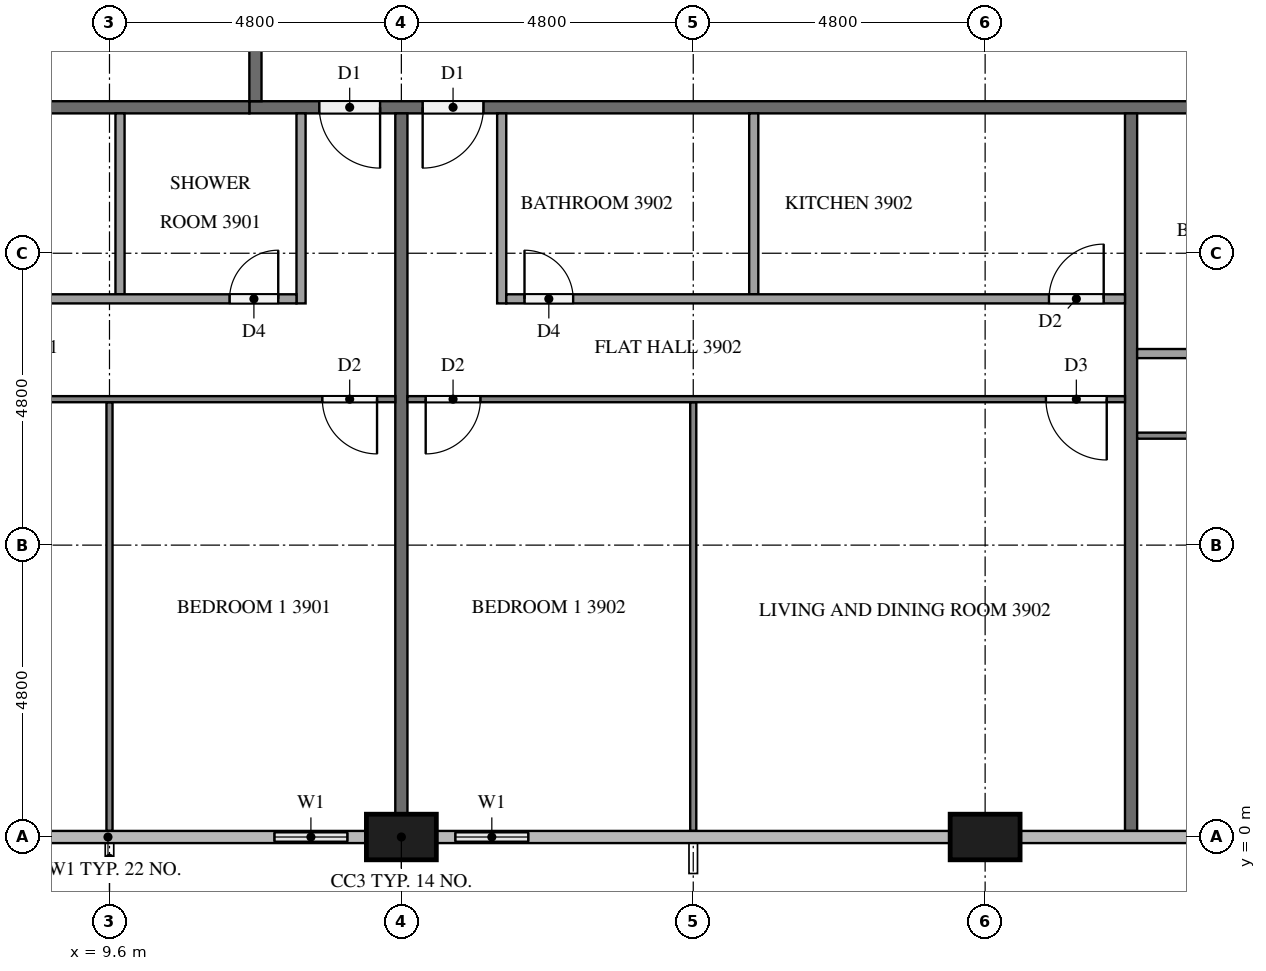
"""IFC4 building model, lengths in metres.
Left out: names, types, materials, properties, quantities, classifications, styles, units other than length and angle.
Written with IfcOpenShell. Run it as: python <this file> out.ifc"""

import sys

from ifc_helpers import new_model, si_unit, direction, frame, frame_2d, origin, origin_2d, place, context, subcontext, project, spatial, rectangle, extrude, element, fill, save


model = new_model("IFC4")
c1 = context("Model", 3, precision=1e-05, world=origin(), true_north=direction((0.0, 1.0)))
c2 = subcontext(c1, "Body", "Model", "MODEL_VIEW")
j1 = project(units=[si_unit("LENGTHUNIT", "METRE"), si_unit("PLANEANGLEUNIT", "RADIAN")], contexts=[c1])
p1 = place(None, origin())
s1 = spatial("IfcSite", under=j1, at=p1, CompositionType="ELEMENT")
p2 = place(p1, origin())
s2 = spatial("IfcBuilding", under=s1, at=p2, CompositionType="ELEMENT")
p3 = place(p2, frame((0.0, 0.0, 152.5)))
s3 = spatial("IfcBuildingStorey", under=s2, at=p3, CompositionType="ELEMENT", Elevation=152.5)
for number, where, z_axis, x_axis in (
    (1, (14.4, 0.0, 0.0), (0.0, 0.0, 1.0), (1.0, 0.0, 0.0)),
    (2, (24.0, 0.0, 0.0), (0.0, 0.0, 1.0), (1.0, 0.0, 0.0)),
):
    element("IfcColumn", number, at=place(p3, frame(where, z_axis=z_axis, x_axis=x_axis)), inside=s3, PredefinedType="COLUMN", context=c2, shape_type="SweptSolid", body=[
        extrude(rectangle(XDim=1.15, YDim=0.75, at=origin_2d()), origin(), (0.0, 0.0, 1.0), 3.2),
    ])
p4 = place(p3, frame((12.0, 0.0, 0.0), z_axis=(0.0, 0.0, 1.0), x_axis=(1.0, 0.0, 0.0)))
e3 = element("IfcWall", 3, at=p4, inside=s3, PredefinedType="SOLIDWALL", context=c2, shape_type="SweptSolid", body=[
    extrude(rectangle(XDim=1.825, YDim=0.15, at=frame_2d((0.913, 0.0))), origin(), (0.0, 0.0, 1.0), 3.2),
])
p5 = place(p4, frame((0.312, 0.0, 0.9)))
e4 = element("IfcOpeningElement", 4, at=p5, cuts=e3, PredefinedType="OPENING", context=c2, shape_type="SweptSolid", body=[
    extrude(rectangle(XDim=1.2, YDim=1.4, at=frame_2d((0.6, 0.7))), frame((0.0, 0.085, 0.0), z_axis=(0.0, -1.0, 0.0), x_axis=(1.0, 0.0, 0.0)), (0.0, 0.0, 1.0), 0.17),
])
p6 = place(p3, frame((14.975, 0.0, 0.0), z_axis=(0.0, 0.0, 1.0), x_axis=(1.0, 0.0, 0.0)))
e5 = element("IfcWall", 5, at=p6, inside=s3, PredefinedType="SOLIDWALL", context=c2, shape_type="SweptSolid", body=[
    extrude(rectangle(XDim=1.825, YDim=0.15, at=frame_2d((0.913, 0.0))), origin(), (0.0, 0.0, 1.0), 3.2),
])
p7 = place(p6, frame((0.312, 0.0, 0.9)))
e6 = element("IfcOpeningElement", 6, at=p7, cuts=e5, PredefinedType="OPENING", context=c2, shape_type="SweptSolid", body=[
    extrude(rectangle(XDim=1.2, YDim=1.4, at=frame_2d((0.6, 0.7))), frame((0.0, 0.085, 0.0), z_axis=(0.0, -1.0, 0.0), x_axis=(1.0, 0.0, 0.0)), (0.0, 0.0, 1.0), 0.17),
])
p8 = place(p3, frame((50.5, 12.0, 0.0), z_axis=(0.0, 0.0, 1.0), x_axis=(-1.0, 0.0, 0.0)))
e7 = element("IfcWall", 7, at=p8, inside=s3, PredefinedType="PARTITIONING", context=c2, shape_type="SweptSolid", body=[
    extrude(rectangle(XDim=38.6, YDim=0.2, at=frame_2d((19.3, 0.0))), origin(), (0.0, 0.0, 1.0), 3.2),
])
p9 = place(p8, frame((36.45, 0.0, 0.0)))
e8 = element("IfcOpeningElement", 8, at=p9, cuts=e7, PredefinedType="OPENING", context=c2, shape_type="SweptSolid", body=[
    extrude(rectangle(XDim=1.0, YDim=2.1, at=frame_2d((0.5, 1.05))), frame((0.0, 0.11, 0.0), z_axis=(0.0, -1.0, 0.0), x_axis=(1.0, 0.0, 0.0)), (0.0, 0.0, 1.0), 0.22),
])
p10 = place(p8, frame((34.75, 0.0, 0.0)))
e9 = element("IfcOpeningElement", 9, at=p10, cuts=e7, PredefinedType="OPENING", context=c2, shape_type="SweptSolid", body=[
    extrude(rectangle(XDim=1.0, YDim=2.1, at=frame_2d((0.5, 1.05))), frame((0.0, 0.11, 0.0), z_axis=(0.0, -1.0, 0.0), x_axis=(1.0, 0.0, 0.0)), (0.0, 0.0, 1.0), 0.22),
])
p11 = place(p8, frame((10.05, 0.0, 0.0)))
e10 = element("IfcOpeningElement", 10, at=p11, cuts=e7, PredefinedType="OPENING", context=c2, shape_type="SweptSolid", body=[
    extrude(rectangle(XDim=1.0, YDim=2.1, at=frame_2d((0.5, 1.05))), frame((0.0, 0.11, 0.0), z_axis=(0.0, -1.0, 0.0), x_axis=(1.0, 0.0, 0.0)), (0.0, 0.0, 1.0), 0.22),
])
p12 = place(p8, frame((8.35, 0.0, 0.0)))
e11 = element("IfcOpeningElement", 11, at=p12, cuts=e7, PredefinedType="OPENING", context=c2, shape_type="SweptSolid", body=[
    extrude(rectangle(XDim=1.0, YDim=2.1, at=frame_2d((0.5, 1.05))), frame((0.0, 0.11, 0.0), z_axis=(0.0, -1.0, 0.0), x_axis=(1.0, 0.0, 0.0)), (0.0, 0.0, 1.0), 0.22),
])
p13 = place(p3, frame((12.0, 12.1, 0.0), z_axis=(0.0, 0.0, 1.0), x_axis=(0.0, 1.0, 0.0)))
e12 = element("IfcWall", 12, at=p13, inside=s3, PredefinedType="PARTITIONING", context=c2, shape_type="SweptSolid", body=[
    extrude(rectangle(XDim=28.6, YDim=0.2, at=frame_2d((14.3, 0.0))), origin(), (0.0, 0.0, 1.0), 3.2),
])
p14 = place(p13, frame((27.35, 0.0, 0.0)))
e13 = element("IfcOpeningElement", 13, at=p14, cuts=e12, PredefinedType="OPENING", context=c2, shape_type="SweptSolid", body=[
    extrude(rectangle(XDim=1.0, YDim=2.1, at=frame_2d((0.5, 1.05))), frame((0.0, 0.11, 0.0), z_axis=(0.0, -1.0, 0.0), x_axis=(1.0, 0.0, 0.0)), (0.0, 0.0, 1.0), 0.22),
])
p15 = place(p13, frame((20.15, 0.0, 0.0)))
e14 = element("IfcOpeningElement", 14, at=p15, cuts=e12, PredefinedType="OPENING", context=c2, shape_type="SweptSolid", body=[
    extrude(rectangle(XDim=1.0, YDim=2.1, at=frame_2d((0.5, 1.05))), frame((0.0, 0.11, 0.0), z_axis=(0.0, -1.0, 0.0), x_axis=(1.0, 0.0, 0.0)), (0.0, 0.0, 1.0), 0.22),
])
p16 = place(p13, frame((10.55, 0.0, 0.0)))
e15 = element("IfcOpeningElement", 15, at=p16, cuts=e12, PredefinedType="OPENING", context=c2, shape_type="SweptSolid", body=[
    extrude(rectangle(XDim=1.0, YDim=2.1, at=frame_2d((0.5, 1.05))), frame((0.0, 0.11, 0.0), z_axis=(0.0, -1.0, 0.0), x_axis=(1.0, 0.0, 0.0)), (0.0, 0.0, 1.0), 0.22),
])
p17 = place(p3, frame((14.4, 11.9, 0.0), z_axis=(0.0, 0.0, 1.0), x_axis=(0.0, -1.0, 0.0)))
e16 = element("IfcWall", 16, at=p17, inside=s3, PredefinedType="PARTITIONING", context=c2, shape_type="SweptSolid", body=[
    extrude(rectangle(XDim=11.525, YDim=0.2, at=frame_2d((5.762, 0.0))), origin(), (0.0, 0.0, 1.0), 3.2),
])
for number, where, z_axis, x_axis in (
    (17, (0.1, 12.0, 0.0), (0.0, 0.0, 1.0), (1.0, 0.0, 0.0)),
    (18, (26.4, 11.9, 0.0), (0.0, 0.0, 1.0), (0.0, -1.0, 0.0)),
):
    element("IfcWall", number, at=place(p3, frame(where, z_axis=z_axis, x_axis=x_axis)), inside=s3, PredefinedType="PARTITIONING", context=c2, shape_type="SweptSolid", body=[
        extrude(rectangle(XDim=11.8, YDim=0.2, at=frame_2d((5.9, 0.0))), origin(), (0.0, 0.0, 1.0), 3.2),
    ])
p18 = place(p3, frame((9.6, 7.15, 0.0), z_axis=(0.0, 0.0, 1.0), x_axis=(0.0, -1.0, 0.0)))
e19 = element("IfcWall", 19, at=p18, inside=s3, PredefinedType="PARTITIONING", context=c2, shape_type="SweptSolid", body=[
    extrude(rectangle(XDim=7.05, YDim=0.1, at=frame_2d((3.525, 0.0))), origin(), (0.0, 0.0, 1.0), 3.2),
])
p19 = place(p3, frame((14.3, 7.2, 0.0), z_axis=(0.0, 0.0, 1.0), x_axis=(-1.0, 0.0, 0.0)))
e20 = element("IfcWall", 20, at=p19, inside=s3, PredefinedType="PARTITIONING", context=c2, shape_type="SweptSolid", body=[
    extrude(rectangle(XDim=14.2, YDim=0.1, at=frame_2d((7.1, 0.0))), origin(), (0.0, 0.0, 1.0), 3.2),
])
p20 = place(p19, frame((0.3, 0.0, 0.0)))
e21 = element("IfcOpeningElement", 21, at=p20, cuts=e20, PredefinedType="OPENING", context=c2, shape_type="SweptSolid", body=[
    extrude(rectangle(XDim=0.9, YDim=2.1, at=frame_2d((0.45, 1.05))), frame((0.0, 0.06, 0.0), z_axis=(0.0, -1.0, 0.0), x_axis=(1.0, 0.0, 0.0)), (0.0, 0.0, 1.0), 0.12),
])
p21 = place(p19, frame((8.25, 0.0, 0.0)))
e22 = element("IfcOpeningElement", 22, at=p21, cuts=e20, PredefinedType="OPENING", context=c2, shape_type="SweptSolid", body=[
    extrude(rectangle(XDim=0.9, YDim=2.1, at=frame_2d((0.45, 1.05))), frame((0.0, 0.06, 0.0), z_axis=(0.0, -1.0, 0.0), x_axis=(1.0, 0.0, 0.0)), (0.0, 0.0, 1.0), 0.12),
])
p22 = place(p19, frame((9.85, 0.0, 0.0)))
e23 = element("IfcOpeningElement", 23, at=p22, cuts=e20, PredefinedType="OPENING", context=c2, shape_type="SweptSolid", body=[
    extrude(rectangle(XDim=1.0, YDim=2.1, at=frame_2d((0.5, 1.05))), frame((0.0, 0.06, 0.0), z_axis=(0.0, -1.0, 0.0), x_axis=(1.0, 0.0, 0.0)), (0.0, 0.0, 1.0), 0.12),
])
p23 = place(p3, frame((9.773, 11.9, 0.0), z_axis=(0.0, 0.0, 1.0), x_axis=(0.0, -1.0, 0.0)))
e24 = element("IfcWall", 24, at=p23, inside=s3, PredefinedType="PARTITIONING", context=c2, shape_type="SweptSolid", body=[
    extrude(rectangle(XDim=2.975, YDim=0.15, at=frame_2d((1.487, 0.0))), origin(), (0.0, 0.0, 1.0), 3.2),
])
p24 = place(p3, frame((12.75, 11.9, 0.0), z_axis=(0.0, 0.0, 1.0), x_axis=(0.0, -1.0, 0.0)))
e25 = element("IfcWall", 25, at=p24, inside=s3, PredefinedType="PARTITIONING", context=c2, shape_type="SweptSolid", body=[
    extrude(rectangle(XDim=3.125, YDim=0.15, at=frame_2d((1.562, 0.0))), origin(), (0.0, 0.0, 1.0), 3.2),
])
p25 = place(p3, frame((0.1, 8.85, 0.0), z_axis=(0.0, 0.0, 1.0), x_axis=(1.0, 0.0, 0.0)))
e26 = element("IfcWall", 26, at=p25, inside=s3, PredefinedType="PARTITIONING", context=c2, shape_type="SweptSolid", body=[
    extrude(rectangle(XDim=12.575, YDim=0.15, at=frame_2d((6.288, 0.0))), origin(), (0.0, 0.0, 1.0), 3.2),
])
p26 = place(p25, frame((11.475, 0.0, 0.0)))
e27 = element("IfcOpeningElement", 27, at=p26, cuts=e26, PredefinedType="OPENING", context=c2, shape_type="SweptSolid", body=[
    extrude(rectangle(XDim=0.8, YDim=2.1, at=frame_2d((0.4, 1.05))), frame((0.0, 0.085, 0.0), z_axis=(0.0, -1.0, 0.0), x_axis=(1.0, 0.0, 0.0)), (0.0, 0.0, 1.0), 0.17),
])
p27 = place(p25, frame((4.194, 0.0, 0.0)))
e28 = element("IfcOpeningElement", 28, at=p27, cuts=e26, PredefinedType="OPENING", context=c2, shape_type="SweptSolid", body=[
    extrude(rectangle(XDim=0.9, YDim=2.1, at=frame_2d((0.45, 1.05))), frame((0.0, 0.085, 0.0), z_axis=(0.0, -1.0, 0.0), x_axis=(1.0, 0.0, 0.0)), (0.0, 0.0, 1.0), 0.17),
])
p28 = place(p25, frame((2.644, 0.0, 0.0)))
e29 = element("IfcOpeningElement", 29, at=p28, cuts=e26, PredefinedType="OPENING", context=c2, shape_type="SweptSolid", body=[
    extrude(rectangle(XDim=0.9, YDim=2.1, at=frame_2d((0.45, 1.05))), frame((0.0, 0.085, 0.0), z_axis=(0.0, -1.0, 0.0), x_axis=(1.0, 0.0, 0.0)), (0.0, 0.0, 1.0), 0.17),
])
p29 = place(p3, frame((19.2, 7.15, 0.0), z_axis=(0.0, 0.0, 1.0), x_axis=(0.0, -1.0, 0.0)))
e30 = element("IfcWall", 30, at=p29, inside=s3, PredefinedType="PARTITIONING", context=c2, shape_type="SweptSolid", body=[
    extrude(rectangle(XDim=7.05, YDim=0.1, at=frame_2d((3.525, 0.0))), origin(), (0.0, 0.0, 1.0), 3.2),
])
p30 = place(p3, frame((26.3, 7.2, 0.0), z_axis=(0.0, 0.0, 1.0), x_axis=(-1.0, 0.0, 0.0)))
e31 = element("IfcWall", 31, at=p30, inside=s3, PredefinedType="PARTITIONING", context=c2, shape_type="SweptSolid", body=[
    extrude(rectangle(XDim=11.8, YDim=0.1, at=frame_2d((5.9, 0.0))), origin(), (0.0, 0.0, 1.0), 3.2),
])
p31 = place(p30, frame((10.6, 0.0, 0.0)))
e32 = element("IfcOpeningElement", 32, at=p31, cuts=e31, PredefinedType="OPENING", context=c2, shape_type="SweptSolid", body=[
    extrude(rectangle(XDim=0.9, YDim=2.1, at=frame_2d((0.45, 1.05))), frame((0.0, 0.06, 0.0), z_axis=(0.0, -1.0, 0.0), x_axis=(1.0, 0.0, 0.0)), (0.0, 0.0, 1.0), 0.12),
])
p32 = place(p30, frame((0.3, 0.0, 0.0)))
e33 = element("IfcOpeningElement", 33, at=p32, cuts=e31, PredefinedType="OPENING", context=c2, shape_type="SweptSolid", body=[
    extrude(rectangle(XDim=1.0, YDim=2.1, at=frame_2d((0.5, 1.05))), frame((0.0, 0.06, 0.0), z_axis=(0.0, -1.0, 0.0), x_axis=(1.0, 0.0, 0.0)), (0.0, 0.0, 1.0), 0.12),
])
p33 = place(p3, frame((20.195, 11.9, 0.0), z_axis=(0.0, 0.0, 1.0), x_axis=(0.0, -1.0, 0.0)))
e34 = element("IfcWall", 34, at=p33, inside=s3, PredefinedType="PARTITIONING", context=c2, shape_type="SweptSolid", body=[
    extrude(rectangle(XDim=2.975, YDim=0.15, at=frame_2d((1.487, 0.0))), origin(), (0.0, 0.0, 1.0), 3.2),
])
p34 = place(p3, frame((16.05, 11.9, 0.0), z_axis=(0.0, 0.0, 1.0), x_axis=(0.0, -1.0, 0.0)))
e35 = element("IfcWall", 35, at=p34, inside=s3, PredefinedType="PARTITIONING", context=c2, shape_type="SweptSolid", body=[
    extrude(rectangle(XDim=3.125, YDim=0.15, at=frame_2d((1.562, 0.0))), origin(), (0.0, 0.0, 1.0), 3.2),
])
p35 = place(p3, frame((16.125, 8.85, 0.0), z_axis=(0.0, 0.0, 1.0), x_axis=(1.0, 0.0, 0.0)))
e36 = element("IfcWall", 36, at=p35, inside=s3, PredefinedType="PARTITIONING", context=c2, shape_type="SweptSolid", body=[
    extrude(rectangle(XDim=10.175, YDim=0.15, at=frame_2d((5.087, 0.0))), origin(), (0.0, 0.0, 1.0), 3.2),
])
p36 = place(p35, frame((0.3, 0.0, 0.0)))
e37 = element("IfcOpeningElement", 37, at=p36, cuts=e36, PredefinedType="OPENING", context=c2, shape_type="SweptSolid", body=[
    extrude(rectangle(XDim=0.8, YDim=2.1, at=frame_2d((0.4, 1.05))), frame((0.0, 0.085, 0.0), z_axis=(0.0, -1.0, 0.0), x_axis=(1.0, 0.0, 0.0)), (0.0, 0.0, 1.0), 0.17),
])
p37 = place(p35, frame((8.925, 0.0, 0.0)))
e38 = element("IfcOpeningElement", 38, at=p37, cuts=e36, PredefinedType="OPENING", context=c2, shape_type="SweptSolid", body=[
    extrude(rectangle(XDim=0.9, YDim=2.1, at=frame_2d((0.45, 1.05))), frame((0.0, 0.085, 0.0), z_axis=(0.0, -1.0, 0.0), x_axis=(1.0, 0.0, 0.0)), (0.0, 0.0, 1.0), 0.17),
])
p38 = place(p3, frame((40.7, 6.6, 0.0), z_axis=(0.0, 0.0, 1.0), x_axis=(-1.0, 0.0, 0.0)))
e39 = element("IfcWall", 39, at=p38, inside=s3, PredefinedType="PARTITIONING", context=c2, shape_type="SweptSolid", body=[
    extrude(rectangle(XDim=14.2, YDim=0.1, at=frame_2d((7.1, 0.0))), origin(), (0.0, 0.0, 1.0), 3.2),
])
p39 = place(p38, frame((0.3, 0.0, 0.0)))
e40 = element("IfcOpeningElement", 40, at=p39, cuts=e39, PredefinedType="OPENING", context=c2, shape_type="SweptSolid", body=[
    extrude(rectangle(XDim=1.0, YDim=2.1, at=frame_2d((0.5, 1.05))), frame((0.0, 0.06, 0.0), z_axis=(0.0, -1.0, 0.0), x_axis=(1.0, 0.0, 0.0)), (0.0, 0.0, 1.0), 0.12),
])
p40 = place(p38, frame((8.25, 0.0, 0.0)))
e41 = element("IfcOpeningElement", 41, at=p40, cuts=e39, PredefinedType="OPENING", context=c2, shape_type="SweptSolid", body=[
    extrude(rectangle(XDim=0.9, YDim=2.1, at=frame_2d((0.45, 1.05))), frame((0.0, 0.06, 0.0), z_axis=(0.0, -1.0, 0.0), x_axis=(1.0, 0.0, 0.0)), (0.0, 0.0, 1.0), 0.12),
])
p41 = place(p38, frame((9.85, 0.0, 0.0)))
e42 = element("IfcOpeningElement", 42, at=p41, cuts=e39, PredefinedType="OPENING", context=c2, shape_type="SweptSolid", body=[
    extrude(rectangle(XDim=0.9, YDim=2.1, at=frame_2d((0.45, 1.05))), frame((0.0, 0.06, 0.0), z_axis=(0.0, -1.0, 0.0), x_axis=(1.0, 0.0, 0.0)), (0.0, 0.0, 1.0), 0.12),
])
p42 = place(p3, frame((26.5, 7.95, 0.0), z_axis=(0.0, 0.0, 1.0), x_axis=(1.0, 0.0, 0.0)))
e43 = element("IfcWall", 43, at=p42, inside=s3, PredefinedType="PARTITIONING", context=c2, shape_type="SweptSolid", body=[
    extrude(rectangle(XDim=12.575, YDim=0.15, at=frame_2d((6.288, 0.0))), origin(), (0.0, 0.0, 1.0), 3.2),
])
p43 = place(p42, frame((11.375, 0.0, 0.0)))
e44 = element("IfcOpeningElement", 44, at=p43, cuts=e43, PredefinedType="OPENING", context=c2, shape_type="SweptSolid", body=[
    extrude(rectangle(XDim=0.9, YDim=2.1, at=frame_2d((0.45, 1.05))), frame((0.0, 0.085, 0.0), z_axis=(0.0, -1.0, 0.0), x_axis=(1.0, 0.0, 0.0)), (0.0, 0.0, 1.0), 0.17),
])
p44 = place(p42, frame((4.194, 0.0, 0.0)))
e45 = element("IfcOpeningElement", 45, at=p44, cuts=e43, PredefinedType="OPENING", context=c2, shape_type="SweptSolid", body=[
    extrude(rectangle(XDim=0.8, YDim=2.1, at=frame_2d((0.4, 1.05))), frame((0.0, 0.085, 0.0), z_axis=(0.0, -1.0, 0.0), x_axis=(1.0, 0.0, 0.0)), (0.0, 0.0, 1.0), 0.17),
])
p45 = place(p42, frame((2.644, 0.0, 0.0)))
e46 = element("IfcOpeningElement", 46, at=p45, cuts=e43, PredefinedType="OPENING", context=c2, shape_type="SweptSolid", body=[
    extrude(rectangle(XDim=0.9, YDim=2.1, at=frame_2d((0.45, 1.05))), frame((0.0, 0.085, 0.0), z_axis=(0.0, -1.0, 0.0), x_axis=(1.0, 0.0, 0.0)), (0.0, 0.0, 1.0), 0.17),
])
p46 = place(p5, origin())
e47 = element("IfcWindow", 47, at=p46, inside=s3, PartitioningType="SINGLE_PANEL", PredefinedType="WINDOW", context=c2, shape_type="SweptSolid", body=[
    extrude(rectangle(XDim=1.2, YDim=1.4, at=frame_2d((0.6, 0.7))), frame((0.0, 0.03, 0.0), z_axis=(0.0, -1.0, 0.0), x_axis=(1.0, 0.0, 0.0)), (0.0, 0.0, 1.0), 0.06),
])
fill(e4, e47)
p47 = place(p7, origin())
e48 = element("IfcWindow", 48, at=p47, inside=s3, PartitioningType="SINGLE_PANEL", PredefinedType="WINDOW", context=c2, shape_type="SweptSolid", body=[
    extrude(rectangle(XDim=1.2, YDim=1.4, at=frame_2d((0.6, 0.7))), frame((0.0, 0.03, 0.0), z_axis=(0.0, -1.0, 0.0), x_axis=(1.0, 0.0, 0.0)), (0.0, 0.0, 1.0), 0.06),
])
fill(e6, e48)
p48 = place(p9, origin())
e49 = element("IfcDoor", 49, at=p48, inside=s3, OperationType="SINGLE_SWING_LEFT", PredefinedType="DOOR", context=c2, shape_type="SweptSolid", body=[
    extrude(rectangle(XDim=1.0, YDim=2.1, at=frame_2d((0.5, 1.05))), frame((0.0, 0.025, 0.0), z_axis=(0.0, -1.0, 0.0), x_axis=(1.0, 0.0, 0.0)), (0.0, 0.0, 1.0), 0.05),
])
fill(e8, e49)
p49 = place(p10, origin())
e50 = element("IfcDoor", 50, at=p49, inside=s3, OperationType="SINGLE_SWING_RIGHT", PredefinedType="DOOR", context=c2, shape_type="SweptSolid", body=[
    extrude(rectangle(XDim=1.0, YDim=2.1, at=frame_2d((0.5, 1.05))), frame((0.0, 0.025, 0.0), z_axis=(0.0, -1.0, 0.0), x_axis=(1.0, 0.0, 0.0)), (0.0, 0.0, 1.0), 0.05),
])
fill(e9, e50)
p50 = place(p20, origin())
e51 = element("IfcDoor", 51, at=p50, inside=s3, OperationType="SINGLE_SWING_LEFT", PredefinedType="DOOR", context=c2, shape_type="SweptSolid", body=[
    extrude(rectangle(XDim=0.9, YDim=2.1, at=frame_2d((0.45, 1.05))), frame((0.0, 0.025, 0.0), z_axis=(0.0, -1.0, 0.0), x_axis=(1.0, 0.0, 0.0)), (0.0, 0.0, 1.0), 0.05),
])
fill(e21, e51)
p51 = place(p26, origin())
e52 = element("IfcDoor", 52, at=p51, inside=s3, OperationType="SINGLE_SWING_RIGHT", PredefinedType="DOOR", context=c2, shape_type="SweptSolid", body=[
    extrude(rectangle(XDim=0.8, YDim=2.1, at=frame_2d((0.4, 1.05))), frame((0.0, 0.025, 0.0), z_axis=(0.0, -1.0, 0.0), x_axis=(1.0, 0.0, 0.0)), (0.0, 0.0, 1.0), 0.05),
])
fill(e27, e52)
p52 = place(p31, origin())
e53 = element("IfcDoor", 53, at=p52, inside=s3, OperationType="SINGLE_SWING_RIGHT", PredefinedType="DOOR", context=c2, shape_type="SweptSolid", body=[
    extrude(rectangle(XDim=0.9, YDim=2.1, at=frame_2d((0.45, 1.05))), frame((0.0, 0.025, 0.0), z_axis=(0.0, -1.0, 0.0), x_axis=(1.0, 0.0, 0.0)), (0.0, 0.0, 1.0), 0.05),
])
fill(e32, e53)
p53 = place(p32, origin())
e54 = element("IfcDoor", 54, at=p53, inside=s3, OperationType="SINGLE_SWING_LEFT", PredefinedType="DOOR", context=c2, shape_type="SweptSolid", body=[
    extrude(rectangle(XDim=1.0, YDim=2.1, at=frame_2d((0.5, 1.05))), frame((0.0, 0.025, 0.0), z_axis=(0.0, -1.0, 0.0), x_axis=(1.0, 0.0, 0.0)), (0.0, 0.0, 1.0), 0.05),
])
fill(e33, e54)
p54 = place(p36, origin())
e55 = element("IfcDoor", 55, at=p54, inside=s3, OperationType="SINGLE_SWING_LEFT", PredefinedType="DOOR", context=c2, shape_type="SweptSolid", body=[
    extrude(rectangle(XDim=0.8, YDim=2.1, at=frame_2d((0.4, 1.05))), frame((0.0, 0.025, 0.0), z_axis=(0.0, -1.0, 0.0), x_axis=(1.0, 0.0, 0.0)), (0.0, 0.0, 1.0), 0.05),
])
fill(e37, e55)
p55 = place(p37, origin())
e56 = element("IfcDoor", 56, at=p55, inside=s3, OperationType="SINGLE_SWING_RIGHT", PredefinedType="DOOR", context=c2, shape_type="SweptSolid", body=[
    extrude(rectangle(XDim=0.9, YDim=2.1, at=frame_2d((0.45, 1.05))), frame((0.0, 0.025, 0.0), z_axis=(0.0, -1.0, 0.0), x_axis=(1.0, 0.0, 0.0)), (0.0, 0.0, 1.0), 0.05),
])
fill(e38, e56)
save(model, sys.argv[1])
